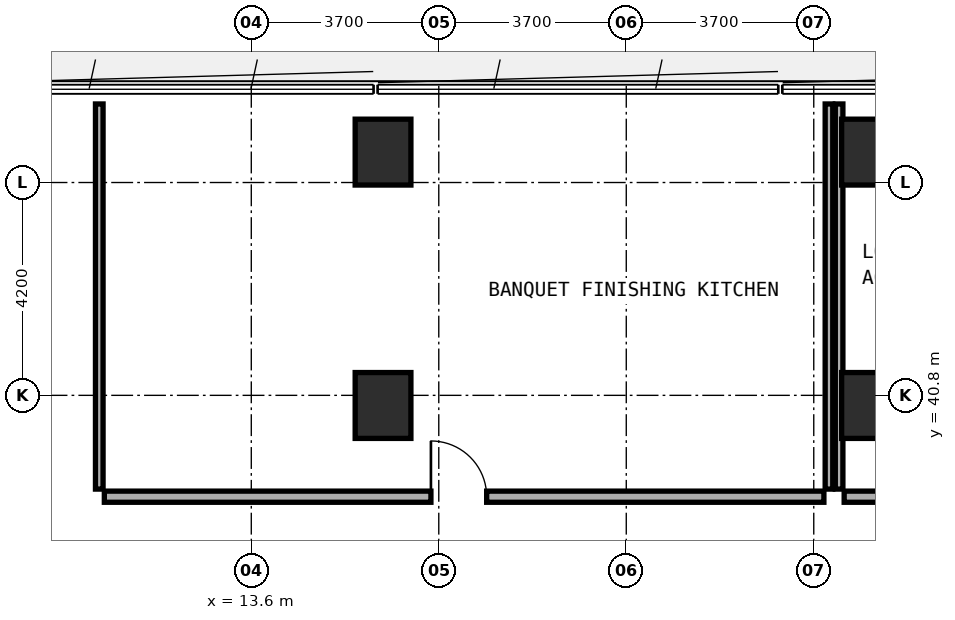
"""IFC4 building model, lengths in metres.
Left out: names, types, materials, properties, quantities, classifications, styles, units other than length and angle.
Written with IfcOpenShell. Run it as: python <this file> out.ifc"""

import sys

from ifc_helpers import new_model, si_unit, direction, frame, frame_2d, origin, origin_2d, place, context, subcontext, project, spatial, rectangle, extrude, element, fill, save


model = new_model("IFC4")
c1 = context("Model", 3, precision=1e-05, world=origin(), true_north=direction((0.0, 1.0)))
c2 = subcontext(c1, "Body", "Model", "MODEL_VIEW")
j1 = project(units=[si_unit("LENGTHUNIT", "METRE"), si_unit("PLANEANGLEUNIT", "RADIAN")], contexts=[c1])
p1 = place(None, origin())
s1 = spatial("IfcSite", under=j1, at=p1, CompositionType="ELEMENT")
p2 = place(p1, origin())
s2 = spatial("IfcBuilding", under=s1, at=p2, CompositionType="ELEMENT")
p3 = place(p2, frame((0.0, 0.0, 10.2)))
s3 = spatial("IfcBuildingStorey", under=s2, at=p3, CompositionType="ELEMENT", Elevation=10.2)
for number, where, z_axis, x_axis in (
    (1, (16.2, 40.6, 0.0), (0.0, 0.0, 1.0), (1.0, 0.0, 0.0)),
    (2, (25.8, 40.6, 0.0), (0.0, 0.0, 1.0), (1.0, 0.0, 0.0)),
    (3, (16.2, 45.6, 0.0), (0.0, 0.0, 1.0), (1.0, 0.0, 0.0)),
    (4, (25.8, 45.6, 0.0), (0.0, 0.0, 1.0), (1.0, 0.0, 0.0)),
):
    element("IfcColumn", number, at=place(p3, frame(where, z_axis=z_axis, x_axis=x_axis)), inside=s3, PredefinedType="COLUMN", context=c2, shape_type="SweptSolid", body=[
        extrude(rectangle(XDim=1.1, YDim=1.3, at=origin_2d()), origin(), (0.0, 0.0, 1.0), 4.8),
    ])
for number, where, z_axis, x_axis in (
    (5, (10.6, 38.95, 0.0), (0.0, 0.0, 1.0), (0.0, 1.0, 0.0)),
    (6, (25.0, 38.95, 0.0), (0.0, 0.0, 1.0), (0.0, 1.0, 0.0)),
):
    element("IfcWall", number, at=place(p3, frame(where, z_axis=z_axis, x_axis=x_axis)), inside=s3, PredefinedType="PARTITIONING", context=c2, shape_type="SweptSolid", body=[
        extrude(rectangle(XDim=7.6, YDim=0.15, at=frame_2d((3.8, 0.0))), origin(), (0.0, 0.0, 1.0), 3.975),
    ])
p4 = place(p3, frame((10.7, 38.8, 0.0), z_axis=(0.0, 0.0, 1.0), x_axis=(1.0, 0.0, 0.0)))
e7 = element("IfcWall", 7, at=p4, inside=s3, PredefinedType="SOLIDWALL", context=c2, shape_type="SweptSolid", body=[
    extrude(rectangle(XDim=14.2, YDim=0.22, at=frame_2d((7.1, 0.0))), origin(), (0.0, 0.0, 1.0), 4.45),
])
p5 = place(p4, frame((6.445, 0.0, 0.0)))
e8 = element("IfcOpeningElement", 8, at=p5, cuts=e7, PredefinedType="OPENING", context=c2, shape_type="SweptSolid", body=[
    extrude(rectangle(XDim=1.1, YDim=2.1, at=frame_2d((0.55, 1.05))), frame((0.0, 0.12, 0.0), z_axis=(0.0, -1.0, 0.0), x_axis=(1.0, 0.0, 0.0)), (0.0, 0.0, 1.0), 0.24),
])
p6 = place(p3, frame((25.2, 38.95, 0.0), z_axis=(0.0, 0.0, 1.0), x_axis=(0.0, 1.0, 0.0)))
e9 = element("IfcWall", 9, at=p6, inside=s3, PredefinedType="PARTITIONING", context=c2, shape_type="SweptSolid", body=[
    extrude(rectangle(XDim=7.6, YDim=0.15, at=frame_2d((3.8, 0.0))), origin(), (0.0, 0.0, 1.0), 3.975),
])
p7 = place(p3, frame((25.3, 38.8, 0.0), z_axis=(0.0, 0.0, 1.0), x_axis=(1.0, 0.0, 0.0)))
e10 = element("IfcWall", 10, at=p7, inside=s3, PredefinedType="SOLIDWALL", context=c2, shape_type="SweptSolid", body=[
    extrude(rectangle(XDim=3.0, YDim=0.22, at=frame_2d((1.5, 0.0))), origin(), (0.0, 0.0, 1.0), 3.525),
])
p8 = place(p7, frame((1.405, 0.0, 0.0)))
e11 = element("IfcOpeningElement", 11, at=p8, cuts=e10, PredefinedType="OPENING", context=c2, shape_type="SweptSolid", body=[
    extrude(rectangle(XDim=1.1, YDim=2.1, at=frame_2d((0.55, 1.05))), frame((0.0, 0.12, 0.0), z_axis=(0.0, -1.0, 0.0), x_axis=(1.0, 0.0, 0.0)), (0.0, 0.0, 1.0), 0.24),
])
p9 = place(p5, origin())
e12 = element("IfcDoor", 12, at=p9, inside=s3, OperationType="SINGLE_SWING_LEFT", PredefinedType="DOOR", context=c2, shape_type="SweptSolid", body=[
    extrude(rectangle(XDim=1.1, YDim=2.1, at=frame_2d((0.55, 1.05))), frame((0.0, 0.025, 0.0), z_axis=(0.0, -1.0, 0.0), x_axis=(1.0, 0.0, 0.0)), (0.0, 0.0, 1.0), 0.05),
])
fill(e8, e12)
save(model, sys.argv[1])
